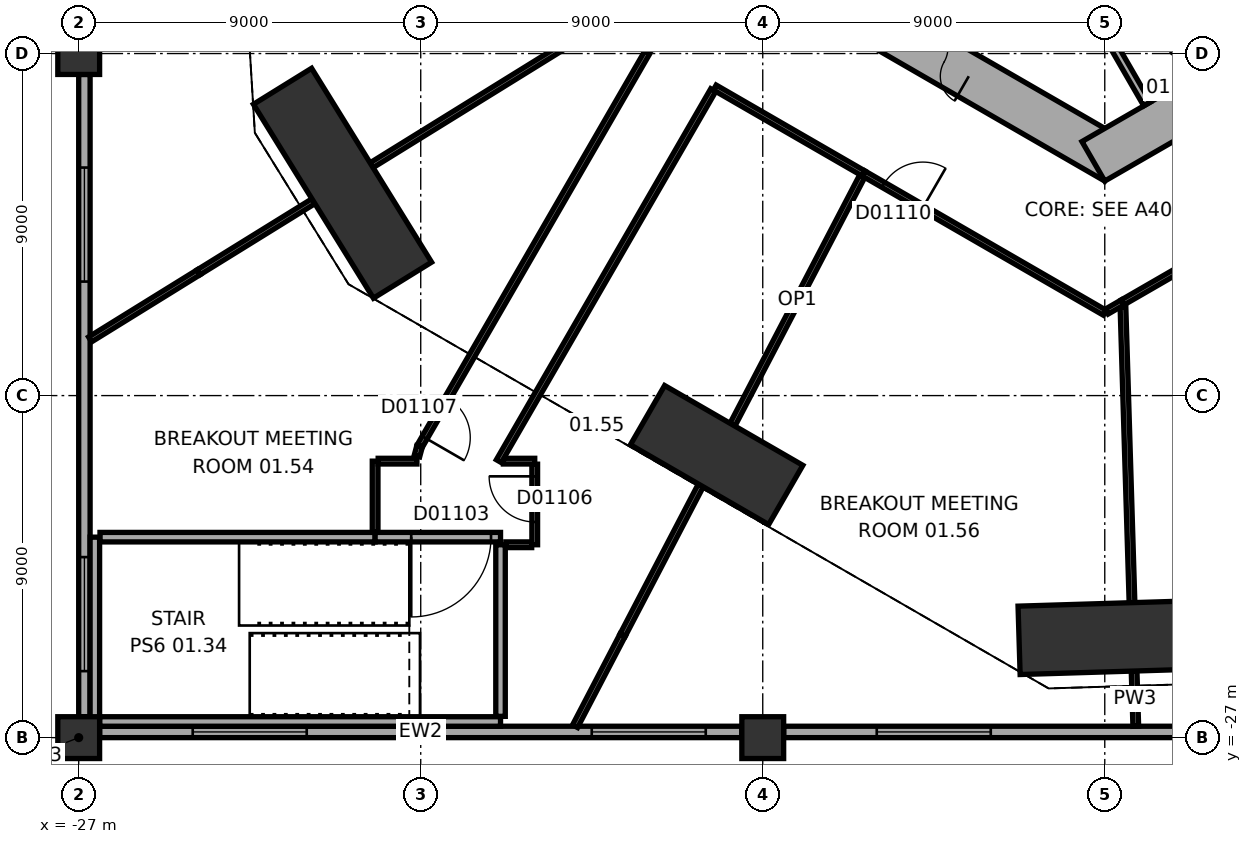
"""IFC4 building model, lengths in metres.
Left out: names, types, materials, properties, quantities, classifications, styles, units other than length and angle.
Written with IfcOpenShell. Run it as: python <this file> out.ifc"""

import sys

from ifc_helpers import new_model, si_unit, direction, frame, frame_2d, origin, origin_2d, place, context, subcontext, project, spatial, rectangle, extrude, element, fill, save


model = new_model("IFC4")
c1 = context("Model", 3, precision=1e-05, world=origin(), true_north=direction((0.0, 1.0)))
c2 = subcontext(c1, "Body", "Model", "MODEL_VIEW")
j1 = project(units=[si_unit("LENGTHUNIT", "METRE"), si_unit("PLANEANGLEUNIT", "RADIAN")], contexts=[c1])
p1 = place(None, origin())
s1 = spatial("IfcSite", under=j1, at=p1, CompositionType="ELEMENT")
p2 = place(p1, origin())
s2 = spatial("IfcBuilding", under=s1, at=p2, CompositionType="ELEMENT")
p3 = place(p2, frame((0.0, 0.0, 7.5)))
s3 = spatial("IfcBuildingStorey", under=s2, at=p3, CompositionType="ELEMENT", Elevation=7.5)
p4 = place(p3, frame((-20.058, -12.413, 0.0), z_axis=(0.0, 0.0, 1.0), x_axis=(0.526202050444, -0.850359572245, 0.0)))
e1 = element("IfcColumn", 1, at=p4, inside=s3, PredefinedType="COLUMN", context=c2, shape_type="SweptSolid", body=[
    extrude(rectangle(XDim=6.0, YDim=1.8, at=origin_2d()), origin(), (0.0, 0.0, 1.0), 5.5),
])
p5 = place(p3, frame((-10.213, -19.564, 0.0), z_axis=(0.0, 0.0, 1.0), x_axis=(0.866028021766, -0.499995465495, 0.0)))
e2 = element("IfcColumn", 2, at=p5, inside=s3, PredefinedType="COLUMN", context=c2, shape_type="SweptSolid", body=[
    extrude(rectangle(XDim=4.2, YDim=1.8, at=origin_2d()), origin(), (0.0, 0.0, 1.0), 5.5),
])
p6 = place(p3, frame((0.744, -24.348, 0.0), z_axis=(0.0, 0.0, 1.0), x_axis=(0.999533484231, 0.03054200224, 0.0)))
e3 = element("IfcColumn", 3, at=p6, inside=s3, PredefinedType="COLUMN", context=c2, shape_type="SweptSolid", body=[
    extrude(rectangle(XDim=6.0, YDim=1.8, at=origin_2d()), origin(), (0.0, 0.0, 1.0), 5.5),
])
for number, where, z_axis, x_axis in (
    (4, (-27.0, -27.0, 0.0), (0.0, 0.0, 1.0), (1.0, 0.0, 0.0)),
    (5, (-27.0, -9.0, 0.0), (0.0, 0.0, 1.0), (1.0, 0.0, 0.0)),
    (6, (-9.0, -27.0, 0.0), (0.0, 0.0, 1.0), (1.0, 0.0, 0.0)),
):
    element("IfcColumn", number, at=place(p3, frame(where, z_axis=z_axis, x_axis=x_axis)), inside=s3, PredefinedType="COLUMN", context=c2, shape_type="SweptSolid", body=[
        extrude(rectangle(XDim=1.1, YDim=1.1, at=origin_2d()), origin(), (0.0, 0.0, 1.0), 5.5),
    ])
p7 = place(p3, frame((-10.4, -5.658, 0.0), z_axis=(0.0, 0.0, 1.0), x_axis=(0.866021384402, -0.500006961711, 0.0)))
e7 = element("IfcWall", 7, at=p7, inside=s3, PredefinedType="SHEAR", context=c2, shape_type="SweptSolid", body=[
    extrude(rectangle(XDim=12.355, YDim=1.2, at=frame_2d((6.178, 0.0))), origin(), (0.0, 0.0, 1.0), 5.5),
])
p8 = place(p7, frame((6.378, 0.0, 0.0)))
e8 = element("IfcOpeningElement", 8, at=p8, cuts=e7, PredefinedType="OPENING", context=c2, shape_type="SweptSolid", body=[
    extrude(rectangle(XDim=1.5, YDim=2.1, at=frame_2d((0.75, 1.05))), frame((0.0, 0.61, 0.0), z_axis=(0.0, -1.0, 0.0), x_axis=(1.0, 0.0, 0.0)), (0.0, 0.0, 1.0), 1.22),
])
p9 = place(p7, frame((3.228, 0.0, 0.0)))
e9 = element("IfcOpeningElement", 9, at=p9, cuts=e7, PredefinedType="OPENING", context=c2, shape_type="SweptSolid", body=[
    extrude(rectangle(XDim=0.9, YDim=2.1, at=frame_2d((0.45, 1.05))), frame((0.0, 0.61, 0.0), z_axis=(0.0, -1.0, 0.0), x_axis=(1.0, 0.0, 0.0)), (0.0, 0.0, 1.0), 1.22),
])
p10 = place(p3, frame((-0.3, -11.836, 0.0), z_axis=(0.0, 0.0, 1.0), x_axis=(0.866021384402, 0.500006961711, 0.0)))
e10 = element("IfcWall", 10, at=p10, inside=s3, PredefinedType="SHEAR", context=c2, shape_type="SweptSolid", body=[
    extrude(rectangle(XDim=12.355, YDim=1.2, at=frame_2d((6.178, 0.0))), origin(), (0.0, 0.0, 1.0), 5.5),
])
p11 = place(p10, frame((2.828, 0.0, 0.0)))
e11 = element("IfcOpeningElement", 11, at=p11, cuts=e10, PredefinedType="OPENING", context=c2, shape_type="SweptSolid", body=[
    extrude(rectangle(XDim=0.9, YDim=2.1, at=frame_2d((0.45, 1.05))), frame((0.0, 0.61, 0.0), z_axis=(0.0, -1.0, 0.0), x_axis=(1.0, 0.0, 0.0)), (0.0, 0.0, 1.0), 1.22),
])
p12 = place(p10, frame((5.428, 0.0, 0.0)))
e12 = element("IfcOpeningElement", 12, at=p12, cuts=e10, PredefinedType="OPENING", context=c2, shape_type="SweptSolid", body=[
    extrude(rectangle(XDim=0.9, YDim=2.1, at=frame_2d((0.45, 1.05))), frame((0.0, 0.61, 0.0), z_axis=(0.0, -1.0, 0.0), x_axis=(1.0, 0.0, 0.0)), (0.0, 0.0, 1.0), 1.22),
])
p13 = place(p10, frame((7.928, 0.0, 0.0)))
e13 = element("IfcOpeningElement", 13, at=p13, cuts=e10, PredefinedType="OPENING", context=c2, shape_type="SweptSolid", body=[
    extrude(rectangle(XDim=1.1, YDim=2.1, at=frame_2d((0.55, 1.05))), frame((0.0, 0.61, 0.0), z_axis=(0.0, -1.0, 0.0), x_axis=(1.0, 0.0, 0.0)), (0.0, 0.0, 1.0), 1.22),
])
p14 = place(p3, frame((-26.45, -26.85, 0.0), z_axis=(0.0, 0.0, 1.0), x_axis=(1.0, 0.0, 0.0)))
e14 = element("IfcWall", 14, at=p14, inside=s3, PredefinedType="STANDARD", context=c2, shape_type="SweptSolid", body=[
    extrude(rectangle(XDim=16.9, YDim=0.3, at=frame_2d((8.45, 0.0))), origin(), (0.0, 0.0, 1.0), 4.0),
])
p15 = place(p14, frame((2.45, 0.0, 1.0)))
e15 = element("IfcOpeningElement", 15, at=p15, cuts=e14, PredefinedType="OPENING", context=c2, shape_type="SweptSolid", body=[
    extrude(rectangle(XDim=3.0, YDim=2.6, at=frame_2d((1.5, 1.3))), frame((0.0, 0.16, 0.0), z_axis=(0.0, -1.0, 0.0), x_axis=(1.0, 0.0, 0.0)), (0.0, 0.0, 1.0), 0.32),
])
p16 = place(p14, frame((12.95, 0.0, 1.0)))
e16 = element("IfcOpeningElement", 16, at=p16, cuts=e14, PredefinedType="OPENING", context=c2, shape_type="SweptSolid", body=[
    extrude(rectangle(XDim=3.0, YDim=2.6, at=frame_2d((1.5, 1.3))), frame((0.0, 0.16, 0.0), z_axis=(0.0, -1.0, 0.0), x_axis=(1.0, 0.0, 0.0)), (0.0, 0.0, 1.0), 0.32),
])
p17 = place(p3, frame((-8.45, -26.85, 0.0), z_axis=(0.0, 0.0, 1.0), x_axis=(1.0, 0.0, 0.0)))
e17 = element("IfcWall", 17, at=p17, inside=s3, PredefinedType="STANDARD", context=c2, shape_type="SweptSolid", body=[
    extrude(rectangle(XDim=16.9, YDim=0.3, at=frame_2d((8.45, 0.0))), origin(), (0.0, 0.0, 1.0), 4.0),
])
p18 = place(p17, frame((2.45, 0.0, 1.0)))
e18 = element("IfcOpeningElement", 18, at=p18, cuts=e17, PredefinedType="OPENING", context=c2, shape_type="SweptSolid", body=[
    extrude(rectangle(XDim=3.0, YDim=2.6, at=frame_2d((1.5, 1.3))), frame((0.0, 0.16, 0.0), z_axis=(0.0, -1.0, 0.0), x_axis=(1.0, 0.0, 0.0)), (0.0, 0.0, 1.0), 0.32),
])
p19 = place(p17, frame((11.45, 0.0, 1.0)))
e19 = element("IfcOpeningElement", 19, at=p19, cuts=e17, PredefinedType="OPENING", context=c2, shape_type="SweptSolid", body=[
    extrude(rectangle(XDim=3.0, YDim=2.6, at=frame_2d((1.5, 1.3))), frame((0.0, 0.16, 0.0), z_axis=(0.0, -1.0, 0.0), x_axis=(1.0, 0.0, 0.0)), (0.0, 0.0, 1.0), 0.32),
])
p20 = place(p3, frame((-26.85, -9.55, 0.0), z_axis=(0.0, 0.0, 1.0), x_axis=(0.0, -1.0, 0.0)))
e20 = element("IfcWall", 20, at=p20, inside=s3, PredefinedType="STANDARD", context=c2, shape_type="SweptSolid", body=[
    extrude(rectangle(XDim=16.9, YDim=0.3, at=frame_2d((8.45, 0.0))), origin(), (0.0, 0.0, 1.0), 4.0),
])
p21 = place(p20, frame((2.45, 0.0, 1.0)))
e21 = element("IfcOpeningElement", 21, at=p21, cuts=e20, PredefinedType="OPENING", context=c2, shape_type="SweptSolid", body=[
    extrude(rectangle(XDim=3.0, YDim=2.6, at=frame_2d((1.5, 1.3))), frame((0.0, 0.16, 0.0), z_axis=(0.0, -1.0, 0.0), x_axis=(1.0, 0.0, 0.0)), (0.0, 0.0, 1.0), 0.32),
])
p22 = place(p20, frame((12.7, 0.0, 1.0)))
e22 = element("IfcOpeningElement", 22, at=p22, cuts=e20, PredefinedType="OPENING", context=c2, shape_type="SweptSolid", body=[
    extrude(rectangle(XDim=3.0, YDim=2.6, at=frame_2d((1.5, 1.3))), frame((0.0, 0.16, 0.0), z_axis=(0.0, -1.0, 0.0), x_axis=(1.0, 0.0, 0.0)), (0.0, 0.0, 1.0), 0.32),
])
p23 = place(p3, frame((0.013, -8.422, 0.0), z_axis=(0.0, 0.0, 1.0), x_axis=(0.500077893725, -0.86598042715, 0.0)))
e23 = element("IfcWall", 23, at=p23, inside=s3, PredefinedType="PARTITIONING", context=c2, shape_type="SweptSolid", body=[
    extrude(rectangle(XDim=2.2, YDim=0.2, at=frame_2d((1.1, 0.0))), origin(), (0.0, 0.0, 1.0), 5.2),
])
p24 = place(p3, frame((0.771, -25.248, 0.0), z_axis=(0.0, 0.0, 1.0), x_axis=(0.030584206332, -0.99953219374, 0.0)))
e24 = element("IfcWall", 24, at=p24, inside=s3, PredefinedType="PARTITIONING", context=c2, shape_type="SweptSolid", body=[
    extrude(rectangle(XDim=1.453, YDim=0.15, at=frame_2d((0.727, 0.0))), origin(), (0.0, 0.0, 1.0), 5.2),
])
p25 = place(p3, frame((-12.686, -24.3, 0.0), z_axis=(0.0, 0.0, 1.0), x_axis=(-0.462800215564, -0.886462610872, 0.0)))
e25 = element("IfcWall", 25, at=p25, inside=s3, PredefinedType="PARTITIONING", context=c2, shape_type="SweptSolid", body=[
    extrude(rectangle(XDim=2.707, YDim=0.15, at=frame_2d((1.354, 0.0))), origin(), (0.0, 0.0, 1.0), 5.2),
])
p26 = place(p3, frame((-12.686, -24.3, 0.0), z_axis=(0.0, 0.0, 1.0), x_axis=(0.462800821993, 0.88646229427, 0.0)))
e26 = element("IfcWall", 26, at=p26, inside=s3, PredefinedType="PARTITIONING", context=c2, shape_type="SweptSolid", body=[
    extrude(rectangle(XDim=4.441, YDim=0.15, at=frame_2d((2.221, 0.0))), origin(), (0.0, 0.0, 1.0), 5.2),
])
p27 = place(p3, frame((-15.9, -21.925, 0.0), z_axis=(0.0, 0.0, 1.0), x_axis=(0.0, -1.0, 0.0)))
e27 = element("IfcWall", 27, at=p27, inside=s3, PredefinedType="SOLIDWALL", context=c2, shape_type="SweptSolid", body=[
    extrude(rectangle(XDim=4.515, YDim=0.25, at=frame_2d((2.257, 0.0))), origin(), (0.0, 0.0, 1.0), 5.2),
])
p28 = place(p3, frame((-15.08, -21.925, 0.0), z_axis=(0.0, 0.0, 1.0), x_axis=(-1.0, 0.0, 0.0)))
e28 = element("IfcWall", 28, at=p28, inside=s3, PredefinedType="PARTITIONING", context=c2, shape_type="SweptSolid", body=[
    extrude(rectangle(XDim=0.68, YDim=0.15, at=frame_2d((0.34, 0.0))), origin(), (0.0, 0.0, 1.0), 5.2),
])
p29 = place(p3, frame((-26.44, -21.725, 0.0), z_axis=(0.0, 0.0, 1.0), x_axis=(1.0, 0.0, 0.0)))
e29 = element("IfcWall", 29, at=p29, inside=s3, PredefinedType="SOLIDWALL", context=c2, shape_type="SweptSolid", body=[
    extrude(rectangle(XDim=7.24, YDim=0.25, at=frame_2d((3.62, 0.0))), origin(), (0.0, 0.0, 1.0), 5.2),
])
p30 = place(p3, frame((-19.2, -21.725, 0.0), z_axis=(0.0, 0.0, 1.0), x_axis=(1.0, 0.0, 0.0)))
e30 = element("IfcWall", 30, at=p30, inside=s3, PredefinedType="SOLIDWALL", context=c2, shape_type="SweptSolid", body=[
    extrude(rectangle(XDim=3.3, YDim=0.25, at=frame_2d((1.65, 0.0))), origin(), (0.0, 0.0, 1.0), 5.2),
])
p31 = place(p30, frame((0.95, 0.0, 0.0)))
e31 = element("IfcOpeningElement", 31, at=p31, cuts=e30, PredefinedType="OPENING", context=c2, shape_type="SweptSolid", body=[
    extrude(rectangle(XDim=2.1, YDim=2.4, at=frame_2d((1.05, 1.2))), frame((0.0, 0.135, 0.0), z_axis=(0.0, -1.0, 0.0), x_axis=(1.0, 0.0, 0.0)), (0.0, 0.0, 1.0), 0.27),
])
p32 = place(p3, frame((-19.2, -21.585, 0.0), z_axis=(0.0, 0.0, 1.0), x_axis=(0.0, 1.0, 0.0)))
e32 = element("IfcWall", 32, at=p32, inside=s3, PredefinedType="PARTITIONING", context=c2, shape_type="SweptSolid", body=[
    extrude(rectangle(XDim=1.86, YDim=0.15, at=frame_2d((0.93, 0.0))), origin(), (0.0, 0.0, 1.0), 5.2),
])
p33 = place(p3, frame((-15.0, -19.805, 0.0), z_axis=(0.0, 0.0, 1.0), x_axis=(0.0, -1.0, 0.0)))
e33 = element("IfcWall", 33, at=p33, inside=s3, PredefinedType="PARTITIONING", context=c2, shape_type="SweptSolid", body=[
    extrude(rectangle(XDim=2.12, YDim=0.15, at=frame_2d((1.06, 0.0))), origin(), (0.0, 0.0, 1.0), 5.2),
])
p34 = place(p33, frame((0.32, 0.0, 0.0)))
e34 = element("IfcOpeningElement", 34, at=p34, cuts=e33, PredefinedType="OPENING", context=c2, shape_type="SweptSolid", body=[
    extrude(rectangle(XDim=1.2, YDim=2.1, at=frame_2d((0.6, 1.05))), frame((0.0, 0.085, 0.0), z_axis=(0.0, -1.0, 0.0), x_axis=(1.0, 0.0, 0.0)), (0.0, 0.0, 1.0), 0.17),
])
p35 = place(p3, frame((-19.12, -19.725, 0.0), z_axis=(0.0, 0.0, 1.0), x_axis=(1.0, 0.0, 0.0)))
e35 = element("IfcWall", 35, at=p35, inside=s3, PredefinedType="PARTITIONING", context=c2, shape_type="SweptSolid", body=[
    extrude(rectangle(XDim=1.02, YDim=0.15, at=frame_2d((0.51, 0.0))), origin(), (0.0, 0.0, 1.0), 5.2),
])
p36 = place(p3, frame((-15.825, -19.725, 0.0), z_axis=(0.0, 0.0, 1.0), x_axis=(1.0, 0.0, 0.0)))
e36 = element("IfcWall", 36, at=p36, inside=s3, PredefinedType="PARTITIONING", context=c2, shape_type="SweptSolid", body=[
    extrude(rectangle(XDim=0.825, YDim=0.15, at=frame_2d((0.413, 0.0))), origin(), (0.0, 0.0, 1.0), 5.2),
])
p37 = place(p3, frame((-18.1, -19.593, 0.0), z_axis=(0.0, 0.0, 1.0), x_axis=(0.260139468531, 0.965571052234, 0.0)))
e37 = element("IfcWall", 37, at=p37, inside=s3, PredefinedType="PARTITIONING", context=c2, shape_type="SweptSolid", body=[
    extrude(rectangle(XDim=0.264, YDim=0.15, at=frame_2d((0.132, 0.0))), origin(), (0.0, 0.0, 1.0), 5.2),
])
p38 = place(p3, frame((-18.021, -19.321, 0.0), z_axis=(0.0, 0.0, 1.0), x_axis=(0.500403049961, 0.865792577694, 0.0)))
e38 = element("IfcWall", 38, at=p38, inside=s3, PredefinedType="PARTITIONING", context=c2, shape_type="SweptSolid", body=[
    extrude(rectangle(XDim=11.963, YDim=0.15, at=frame_2d((5.982, 0.0))), origin(), (0.0, 0.0, 1.0), 5.2),
])
p39 = place(p38, frame((0.25, 0.0, 0.0)))
e39 = element("IfcOpeningElement", 39, at=p39, cuts=e38, PredefinedType="OPENING", context=c2, shape_type="SweptSolid", body=[
    extrude(rectangle(XDim=1.2, YDim=2.1, at=frame_2d((0.6, 1.05))), frame((0.0, 0.085, 0.0), z_axis=(0.0, -1.0, 0.0), x_axis=(1.0, 0.0, 0.0)), (0.0, 0.0, 1.0), 0.17),
])
p40 = place(p3, frame((-9.796, -18.766, 0.0), z_axis=(0.0, 0.0, 1.0), x_axis=(0.462793341808, 0.886466199456, 0.0)))
e40 = element("IfcWall", 40, at=p40, inside=s3, PredefinedType="MOVABLE", context=c2, shape_type="SweptSolid", body=[
    extrude(rectangle(XDim=7.376, YDim=0.15, at=frame_2d((3.688, 0.0))), origin(), (0.0, 0.0, 1.0), 5.2),
])
p41 = place(p3, frame((0.0, -15.82, 0.0), z_axis=(0.0, 0.0, 1.0), x_axis=(-0.866018019704, 0.500012789385, 0.0)))
e41 = element("IfcWall", 41, at=p41, inside=s3, PredefinedType="PARTITIONING", context=c2, shape_type="SweptSolid", body=[
    extrude(rectangle(XDim=7.327, YDim=0.15, at=frame_2d((3.664, 0.0))), origin(), (0.0, 0.0, 1.0), 5.2),
])
p42 = place(p41, frame((5.527, 0.0, 0.0)))
e42 = element("IfcOpeningElement", 42, at=p42, cuts=e41, PredefinedType="OPENING", context=c2, shape_type="SweptSolid", body=[
    extrude(rectangle(XDim=1.2, YDim=2.1, at=frame_2d((0.6, 1.05))), frame((0.0, 0.085, 0.0), z_axis=(0.0, -1.0, 0.0), x_axis=(1.0, 0.0, 0.0)), (0.0, 0.0, 1.0), 0.17),
])
p43 = place(p3, frame((0.479, -15.665, 0.0), z_axis=(0.0, 0.0, 1.0), x_axis=(0.030535907252, -0.999533670453, 0.0)))
e43 = element("IfcWall", 43, at=p43, inside=s3, PredefinedType="PARTITIONING", context=c2, shape_type="SweptSolid", body=[
    extrude(rectangle(XDim=7.787, YDim=0.15, at=frame_2d((3.894, 0.0))), origin(), (0.0, 0.0, 1.0), 5.2),
])
p44 = place(p3, frame((0.475, -15.545, 0.0), z_axis=(0.0, 0.0, 1.0), x_axis=(0.866021168401, 0.500007335828, 0.0)))
e44 = element("IfcWall", 44, at=p44, inside=s3, PredefinedType="PARTITIONING", context=c2, shape_type="SweptSolid", body=[
    extrude(rectangle(XDim=7.616, YDim=0.15, at=frame_2d((3.808, 0.0))), origin(), (0.0, 0.0, 1.0), 5.2),
])
p45 = place(p3, frame((0.475, -15.545, 0.0), z_axis=(0.0, 0.0, 1.0), x_axis=(-0.865927594567, -0.50016937228, 0.0)))
e45 = element("IfcWall", 45, at=p45, inside=s3, PredefinedType="PARTITIONING", context=c2, shape_type="SweptSolid", body=[
    extrude(rectangle(XDim=0.489, YDim=0.15, at=frame_2d((0.244, 0.0))), origin(), (0.0, 0.0, 1.0), 5.2),
])
p46 = place(p3, frame((-23.843, -14.754, 0.0), z_axis=(0.0, 0.0, 1.0), x_axis=(-0.850333278488, -0.526244539635, 0.0)))
e46 = element("IfcWall", 46, at=p46, inside=s3, PredefinedType="PARTITIONING", context=c2, shape_type="SweptSolid", body=[
    extrude(rectangle(XDim=3.36, YDim=0.15, at=frame_2d((1.68, 0.0))), origin(), (0.0, 0.0, 1.0), 5.2),
])
p47 = place(p3, frame((-23.843, -14.754, 0.0), z_axis=(0.0, 0.0, 1.0), x_axis=(0.850369165181, 0.526186547633, 0.0)))
e47 = element("IfcWall", 47, at=p47, inside=s3, PredefinedType="PARTITIONING", context=c2, shape_type="SweptSolid", body=[
    extrude(rectangle(XDim=3.551, YDim=0.15, at=frame_2d((1.775, 0.0))), origin(), (0.0, 0.0, 1.0), 5.2),
])
p48 = place(p3, frame((-6.346, -12.156, 0.0), z_axis=(0.0, 0.0, 1.0), x_axis=(-0.866015706063, 0.50001679657, 0.0)))
e48 = element("IfcWall", 48, at=p48, inside=s3, PredefinedType="PARTITIONING", context=c2, shape_type="SweptSolid", body=[
    extrude(rectangle(XDim=4.523, YDim=0.15, at=frame_2d((2.262, 0.0))), origin(), (0.0, 0.0, 1.0), 5.2),
])
p49 = place(p3, frame((-19.293, -11.939, 0.0), z_axis=(0.0, 0.0, 1.0), x_axis=(0.85034374829, 0.526227621609, 0.0)))
e49 = element("IfcWall", 49, at=p49, inside=s3, PredefinedType="PARTITIONING", context=c2, shape_type="SweptSolid", body=[
    extrude(rectangle(XDim=7.016, YDim=0.15, at=frame_2d((3.508, 0.0))), origin(), (0.0, 0.0, 1.0), 5.2),
])
p50 = place(p3, frame((-10.303, -9.963, 0.0), z_axis=(0.0, 0.0, 1.0), x_axis=(-0.500409628778, -0.865788775295, 0.0)))
e50 = element("IfcWall", 50, at=p50, inside=s3, PredefinedType="PARTITIONING", context=c2, shape_type="SweptSolid", body=[
    extrude(rectangle(XDim=11.275, YDim=0.15, at=frame_2d((5.637, 0.0))), origin(), (0.0, 0.0, 1.0), 5.2),
])
p51 = place(p3, frame((-11.995, -8.894, 0.0), z_axis=(0.0, 0.0, 1.0), x_axis=(-0.866076810767, 0.499910949922, 0.0)))
e51 = element("IfcWall", 51, at=p51, inside=s3, PredefinedType="PARTITIONING", context=c2, shape_type="SweptSolid", body=[
    extrude(rectangle(XDim=1.42, YDim=0.15, at=frame_2d((0.71, 0.0))), origin(), (0.0, 0.0, 1.0), 5.2),
])
p52 = place(p3, frame((-26.575, -21.725, 0.0), z_axis=(0.0, 0.0, 1.0), x_axis=(0.0, -1.0, 0.0)))
e52 = element("IfcWall", 52, at=p52, inside=s3, PredefinedType="SOLIDWALL", context=c2, shape_type="SweptSolid", body=[
    extrude(rectangle(XDim=4.975, YDim=0.25, at=frame_2d((2.487, 0.0))), origin(), (0.0, 0.0, 1.0), 5.2),
])
p53 = place(p3, frame((-26.45, -26.575, 0.0), z_axis=(0.0, 0.0, 1.0), x_axis=(1.0, 0.0, 0.0)))
e53 = element("IfcWall", 53, at=p53, inside=s3, PredefinedType="SOLIDWALL", context=c2, shape_type="SweptSolid", body=[
    extrude(rectangle(XDim=10.55, YDim=0.25, at=frame_2d((5.275, 0.0))), origin(), (0.0, 0.0, 1.0), 5.2),
])
p54 = place(p15, origin())
e54 = element("IfcWindow", 54, at=p54, inside=s3, PartitioningType="SINGLE_PANEL", PredefinedType="WINDOW", context=c2, shape_type="SweptSolid", body=[
    extrude(rectangle(XDim=3.0, YDim=2.6, at=frame_2d((1.5, 1.3))), frame((0.0, 0.03, 0.0), z_axis=(0.0, -1.0, 0.0), x_axis=(1.0, 0.0, 0.0)), (0.0, 0.0, 1.0), 0.06),
])
fill(e15, e54)
p55 = place(p16, origin())
e55 = element("IfcWindow", 55, at=p55, inside=s3, PartitioningType="SINGLE_PANEL", PredefinedType="WINDOW", context=c2, shape_type="SweptSolid", body=[
    extrude(rectangle(XDim=3.0, YDim=2.6, at=frame_2d((1.5, 1.3))), frame((0.0, 0.03, 0.0), z_axis=(0.0, -1.0, 0.0), x_axis=(1.0, 0.0, 0.0)), (0.0, 0.0, 1.0), 0.06),
])
fill(e16, e55)
p56 = place(p18, origin())
e56 = element("IfcWindow", 56, at=p56, inside=s3, PartitioningType="SINGLE_PANEL", PredefinedType="WINDOW", context=c2, shape_type="SweptSolid", body=[
    extrude(rectangle(XDim=3.0, YDim=2.6, at=frame_2d((1.5, 1.3))), frame((0.0, 0.03, 0.0), z_axis=(0.0, -1.0, 0.0), x_axis=(1.0, 0.0, 0.0)), (0.0, 0.0, 1.0), 0.06),
])
fill(e18, e56)
p57 = place(p21, origin())
e57 = element("IfcWindow", 57, at=p57, inside=s3, PartitioningType="SINGLE_PANEL", PredefinedType="WINDOW", context=c2, shape_type="SweptSolid", body=[
    extrude(rectangle(XDim=3.0, YDim=2.6, at=frame_2d((1.5, 1.3))), frame((0.0, 0.03, 0.0), z_axis=(0.0, -1.0, 0.0), x_axis=(1.0, 0.0, 0.0)), (0.0, 0.0, 1.0), 0.06),
])
fill(e21, e57)
p58 = place(p22, origin())
e58 = element("IfcWindow", 58, at=p58, inside=s3, PartitioningType="SINGLE_PANEL", PredefinedType="WINDOW", context=c2, shape_type="SweptSolid", body=[
    extrude(rectangle(XDim=3.0, YDim=2.6, at=frame_2d((1.5, 1.3))), frame((0.0, 0.03, 0.0), z_axis=(0.0, -1.0, 0.0), x_axis=(1.0, 0.0, 0.0)), (0.0, 0.0, 1.0), 0.06),
])
fill(e22, e58)
p59 = place(p8, origin())
e59 = element("IfcDoor", 59, at=p59, inside=s3, OperationType="DOUBLE_DOOR_SINGLE_SWING", PredefinedType="DOOR", context=c2, shape_type="SweptSolid", body=[
    extrude(rectangle(XDim=1.5, YDim=2.1, at=frame_2d((0.75, 1.05))), frame((0.0, 0.025, 0.0), z_axis=(0.0, -1.0, 0.0), x_axis=(1.0, 0.0, 0.0)), (0.0, 0.0, 1.0), 0.05),
])
fill(e8, e59)
p60 = place(p31, frame((2.1, 0.0, 0.0), z_axis=(0.0, 0.0, 1.0), x_axis=(-1.0, 0.0, 0.0)))
e60 = element("IfcDoor", 60, at=p60, inside=s3, OperationType="DOUBLE_DOOR_SINGLE_SWING", PredefinedType="DOOR", context=c2, shape_type="SweptSolid", body=[
    extrude(rectangle(XDim=2.1, YDim=2.4, at=frame_2d((1.05, 1.2))), frame((0.0, 0.025, 0.0), z_axis=(0.0, -1.0, 0.0), x_axis=(1.0, 0.0, 0.0)), (0.0, 0.0, 1.0), 0.05),
])
fill(e31, e60)
p61 = place(p34, origin())
e61 = element("IfcDoor", 61, at=p61, inside=s3, OperationType="SINGLE_SWING_LEFT", PredefinedType="DOOR", context=c2, shape_type="SweptSolid", body=[
    extrude(rectangle(XDim=1.2, YDim=2.1, at=frame_2d((0.6, 1.05))), frame((0.0, 0.025, 0.0), z_axis=(0.0, -1.0, 0.0), x_axis=(1.0, 0.0, 0.0)), (0.0, 0.0, 1.0), 0.05),
])
fill(e34, e61)
p62 = place(p39, origin())
e62 = element("IfcDoor", 62, at=p62, inside=s3, OperationType="SINGLE_SWING_LEFT", PredefinedType="DOOR", context=c2, shape_type="SweptSolid", body=[
    extrude(rectangle(XDim=1.2, YDim=2.1, at=frame_2d((0.6, 1.05))), frame((0.0, 0.025, 0.0), z_axis=(0.0, -1.0, 0.0), x_axis=(1.0, 0.0, 0.0)), (0.0, 0.0, 1.0), 0.05),
])
fill(e39, e62)
p63 = place(p42, origin())
e63 = element("IfcDoor", 63, at=p63, inside=s3, OperationType="SINGLE_SWING_LEFT", PredefinedType="DOOR", context=c2, shape_type="SweptSolid", body=[
    extrude(rectangle(XDim=1.2, YDim=2.1, at=frame_2d((0.6, 1.05))), frame((0.0, 0.025, 0.0), z_axis=(0.0, -1.0, 0.0), x_axis=(1.0, 0.0, 0.0)), (0.0, 0.0, 1.0), 0.05),
])
fill(e42, e63)
save(model, sys.argv[1])
